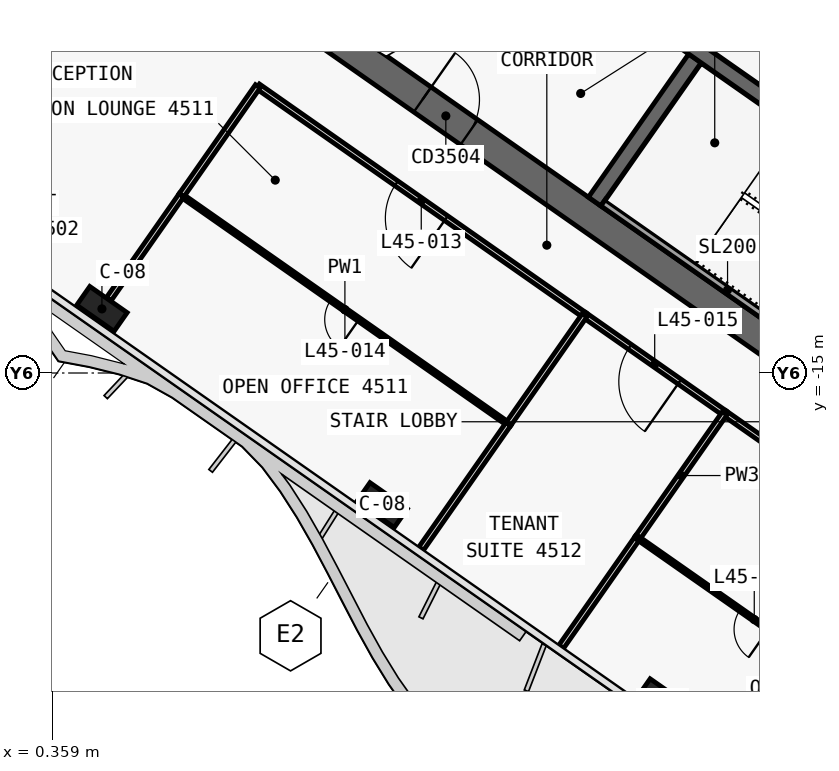
"""IFC4 building model, lengths in metres.
Left out: names, types, materials, properties, quantities, classifications, styles, units other than length and angle.
Written with IfcOpenShell. Run it as: python <this file> out.ifc"""

import sys

from ifc_helpers import new_model, si_unit, direction, frame, frame_2d, origin, origin_2d, place, context, subcontext, project, spatial, polyline, rectangle, outline, extrude, element, fill, save


model = new_model("IFC4")
c1 = context("Model", 3, precision=1e-05, world=origin(), true_north=direction((0.0, 1.0)))
c2 = subcontext(c1, "Body", "Model", "MODEL_VIEW")
j1 = project(units=[si_unit("LENGTHUNIT", "METRE"), si_unit("PLANEANGLEUNIT", "RADIAN")], contexts=[c1])
p1 = place(None, origin())
s1 = spatial("IfcSite", under=j1, at=p1, CompositionType="ELEMENT")
p2 = place(p1, origin())
s2 = spatial("IfcBuilding", under=s1, at=p2, CompositionType="ELEMENT")
p3 = place(p2, frame((0.0, 0.0, 194.4)))
s3 = spatial("IfcBuildingStorey", under=s2, at=p3, CompositionType="ELEMENT", Elevation=194.4)
p4 = place(p3, frame((-0.029, 11.984, 0.0), z_axis=(0.0, 0.0, 1.0), x_axis=(0.819151382952, -0.573577380837, 0.0)))
e1 = element("IfcWall", 1, at=p4, inside=s3, PredefinedType="SHEAR", context=c2, shape_type="SweptSolid", body=[
    extrude(outline(polyline([(33.898, 0.4), (-0.0, 0.4), (0.56, -0.4), (33.898, -0.4), (33.898, 0.4)])), origin(), (0.0, 0.0, 1.0), 3.9),
])
p5 = place(p3, frame((-0.029, -0.712, 0.0), z_axis=(0.0, 0.0, 1.0), x_axis=(0.819151758019, -0.573576845187, 0.0)))
e2 = element("IfcWall", 2, at=p5, inside=s3, PredefinedType="SHEAR", context=c2, shape_type="SweptSolid", body=[
    extrude(outline(polyline([(26.616, 0.4), (-0.0, 0.4), (0.56, -0.4), (26.616, -0.4), (26.616, 0.4)])), origin(), (0.0, 0.0, 1.0), 3.9),
])
p6 = place(p5, frame((6.666, 0.0, 0.0)))
e3 = element("IfcOpeningElement", 3, at=p6, cuts=e2, PredefinedType="OPENING", context=c2, shape_type="SweptSolid", body=[
    extrude(rectangle(XDim=1.5, YDim=2.1, at=frame_2d((0.75, 1.05))), frame((0.0, 0.41, 0.0), z_axis=(0.0, -1.0, 0.0), x_axis=(1.0, 0.0, 0.0)), (0.0, 0.0, 1.0), 0.82),
])
p7 = place(p5, frame((12.366, 0.0, 0.0)))
e4 = element("IfcOpeningElement", 4, at=p7, cuts=e2, PredefinedType="OPENING", context=c2, shape_type="SweptSolid", body=[
    extrude(rectangle(XDim=1.5, YDim=2.1, at=frame_2d((0.75, 1.05))), frame((0.0, 0.41, 0.0), z_axis=(0.0, -1.0, 0.0), x_axis=(1.0, 0.0, 0.0)), (0.0, 0.0, 1.0), 0.82),
])
p8 = place(p3, frame((14.63, -10.488, 0.0), z_axis=(0.0, 0.0, 1.0), x_axis=(0.573611936273, 0.819127185829, 0.0)))
e5 = element("IfcWall", 5, at=p8, inside=s3, PredefinedType="SHEAR", context=c2, shape_type="SweptSolid", body=[
    extrude(outline(polyline([(0.0, 0.2), (0.0, -0.2), (4.6, -0.2), (4.6, 0.2), (0.0, 0.2)])), origin(), (0.0, 0.0, 1.0), 3.9),
])
p9 = place(p3, frame((2.638, 3.768, 0.0), z_axis=(0.0, 0.0, 1.0), x_axis=(0.81915267502, -0.573575535572, 0.0)))
e6 = element("IfcWall", 6, at=p9, inside=s3, PredefinedType="SHEAR", context=c2, shape_type="SweptSolid", body=[
    extrude(outline(polyline([(0.0, 0.2), (0.0, -0.2), (26.2, -0.2), (26.2, 0.2), (0.0, 0.2)])), origin(), (0.0, 0.0, 1.0), 3.9),
])
p10 = place(p9, frame((9.637, 0.0, 0.0)))
e7 = element("IfcOpeningElement", 7, at=p10, cuts=e6, PredefinedType="OPENING", context=c2, shape_type="SweptSolid", body=[
    extrude(rectangle(XDim=1.2, YDim=2.1, at=frame_2d((0.6, 1.05))), frame((0.0, 0.21, 0.0), z_axis=(0.0, -1.0, 0.0), x_axis=(1.0, 0.0, 0.0)), (0.0, 0.0, 1.0), 0.42),
])
p11 = place(p9, frame((11.812, 0.0, 0.0)))
e8 = element("IfcOpeningElement", 8, at=p11, cuts=e6, PredefinedType="OPENING", context=c2, shape_type="SweptSolid", body=[
    extrude(rectangle(XDim=1.2, YDim=2.1, at=frame_2d((0.6, 1.05))), frame((0.0, 0.21, 0.0), z_axis=(0.0, -1.0, 0.0), x_axis=(1.0, 0.0, 0.0)), (0.0, 0.0, 1.0), 0.42),
])
p12 = place(p9, frame((13.988, 0.0, 0.0)))
e9 = element("IfcOpeningElement", 9, at=p12, cuts=e6, PredefinedType="OPENING", context=c2, shape_type="SweptSolid", body=[
    extrude(rectangle(XDim=1.2, YDim=2.1, at=frame_2d((0.6, 1.05))), frame((0.0, 0.21, 0.0), z_axis=(0.0, -1.0, 0.0), x_axis=(1.0, 0.0, 0.0)), (0.0, 0.0, 1.0), 0.42),
])
p13 = place(p9, frame((16.262, 0.0, 0.0)))
e10 = element("IfcOpeningElement", 10, at=p13, cuts=e6, PredefinedType="OPENING", context=c2, shape_type="SweptSolid", body=[
    extrude(rectangle(XDim=1.0, YDim=2.1, at=frame_2d((0.5, 1.05))), frame((0.0, 0.21, 0.0), z_axis=(0.0, -1.0, 0.0), x_axis=(1.0, 0.0, 0.0)), (0.0, 0.0, 1.0), 0.42),
])
for number, where, z_axis, x_axis in (
    (11, (1.665, -13.313, 0.0), (0.0, 0.0, 1.0), (0.819, -0.574, 0.0)),
    (12, (9.038, -18.475, 0.0), (0.0, 0.0, 1.0), (0.819, -0.574, 0.0)),
    (13, (16.41, -23.637, 0.0), (0.0, 0.0, 1.0), (0.819, -0.574, 0.0)),
):
    element("IfcColumn", number, at=place(p3, frame(where, z_axis=z_axis, x_axis=x_axis)), inside=s3, PredefinedType="COLUMN", context=c2, shape_type="SweptSolid", body=[
        extrude(rectangle(XDim=1.2, YDim=0.6, at=origin_2d()), origin(), (0.0, 0.0, 1.0), 3.9),
    ])
p14 = place(p3, frame((14.851, -10.521, 0.0), z_axis=(0.0, 0.0, 1.0), x_axis=(0.819141584393, -0.57359137434, 0.0)))
e14 = element("IfcWall", 14, at=p14, inside=s3, PredefinedType="SOLIDWALL", context=c2, shape_type="SweptSolid", body=[
    extrude(rectangle(XDim=8.0, YDim=0.2, at=frame_2d((4.0, 0.0))), origin(), (0.0, 0.0, 1.0), 3.62),
])
p15 = place(p3, frame((14.369, -13.479, 0.0), z_axis=(0.0, 0.0, 1.0), x_axis=(-0.819154371039, 0.573573113393, 0.0)))
e15 = element("IfcWall", 15, at=p15, inside=s3, PredefinedType="PARTITIONING", context=c2, shape_type="SweptSolid", body=[
    extrude(rectangle(XDim=10.502, YDim=0.15, at=frame_2d((5.251, 0.0))), origin(), (0.0, 0.0, 1.0), 3.0),
])
p16 = place(p15, frame((4.451, 0.0, 0.0)))
e16 = element("IfcOpeningElement", 16, at=p16, cuts=e15, PredefinedType="OPENING", context=c2, shape_type="SweptSolid", body=[
    extrude(rectangle(XDim=1.6, YDim=2.1, at=frame_2d((0.8, 1.05))), frame((0.0, 0.085, 0.0), z_axis=(0.0, -1.0, 0.0), x_axis=(1.0, 0.0, 0.0)), (0.0, 0.0, 1.0), 0.17),
])
p17 = place(p3, frame((18.055, -16.061, 0.0), z_axis=(0.0, 0.0, 1.0), x_axis=(-0.819183534257, 0.573531461389, 0.0)))
e17 = element("IfcWall", 17, at=p17, inside=s3, PredefinedType="PARTITIONING", context=c2, shape_type="SweptSolid", body=[
    extrude(rectangle(XDim=4.504, YDim=0.15, at=frame_2d((2.252, 0.0))), origin(), (0.0, 0.0, 1.0), 3.62),
])
p18 = place(p17, frame((1.452, 0.0, 0.0)))
e18 = element("IfcOpeningElement", 18, at=p18, cuts=e17, PredefinedType="OPENING", context=c2, shape_type="SweptSolid", body=[
    extrude(rectangle(XDim=1.6, YDim=2.1, at=frame_2d((0.8, 1.05))), frame((0.0, 0.085, 0.0), z_axis=(0.0, -1.0, 0.0), x_axis=(1.0, 0.0, 0.0)), (0.0, 0.0, 1.0), 0.17),
])
p19 = place(p3, frame((24.199, -20.362, 0.0), z_axis=(0.0, 0.0, 1.0), x_axis=(-0.819164661457, 0.573558416746, 0.0)))
e19 = element("IfcWall", 19, at=p19, inside=s3, PredefinedType="PARTITIONING", context=c2, shape_type="SweptSolid", body=[
    extrude(rectangle(XDim=7.504, YDim=0.15, at=frame_2d((3.752, 0.0))), origin(), (0.0, 0.0, 1.0), 3.0),
])
p20 = place(p19, frame((2.952, 0.0, 0.0)))
e20 = element("IfcOpeningElement", 20, at=p20, cuts=e19, PredefinedType="OPENING", context=c2, shape_type="SweptSolid", body=[
    extrude(rectangle(XDim=1.6, YDim=2.1, at=frame_2d((0.8, 1.05))), frame((0.0, 0.085, 0.0), z_axis=(0.0, -1.0, 0.0), x_axis=(1.0, 0.0, 0.0)), (0.0, 0.0, 1.0), 0.17),
])
p21 = place(p3, frame((12.359, -16.346, 0.0), z_axis=(0.0, 0.0, 1.0), x_axis=(-0.819155448096, 0.573571575181, 0.0)))
e21 = element("IfcWall", 21, at=p21, inside=s3, PredefinedType="PARTITIONING", context=c2, shape_type="SweptSolid", body=[
    extrude(rectangle(XDim=10.5, YDim=0.1, at=frame_2d((5.25, 0.0))), origin(), (0.0, 0.0, 1.0), 3.0),
])
p22 = place(p21, frame((4.8, 0.0, 0.0)))
e22 = element("IfcOpeningElement", 22, at=p22, cuts=e21, PredefinedType="OPENING", context=c2, shape_type="SweptSolid", body=[
    extrude(rectangle(XDim=0.9, YDim=2.1, at=frame_2d((0.45, 1.05))), frame((0.0, 0.06, 0.0), z_axis=(0.0, -1.0, 0.0), x_axis=(1.0, 0.0, 0.0)), (0.0, 0.0, 1.0), 0.12),
])
p23 = place(p3, frame((12.359, -16.346, 0.0), z_axis=(0.0, 0.0, 1.0), x_axis=(-0.573560675104, -0.819163080207, 0.0)))
e23 = element("IfcWall", 23, at=p23, inside=s3, PredefinedType="PARTITIONING", context=c2, shape_type="SweptSolid", body=[
    extrude(rectangle(XDim=3.999, YDim=0.15, at=frame_2d((2.0, 0.0))), origin(), (0.0, 0.0, 1.0), 2.9),
])
p24 = place(p3, frame((1.849, -13.051, 0.0), z_axis=(0.0, 0.0, 1.0), x_axis=(0.573595235521, 0.819138880647, 0.0)))
e24 = element("IfcWall", 24, at=p24, inside=s3, PredefinedType="PARTITIONING", context=c2, shape_type="SweptSolid", body=[
    extrude(rectangle(XDim=3.329, YDim=0.15, at=frame_2d((1.665, 0.0))), origin(), (0.0, 0.0, 1.0), 3.0),
])
p25 = place(p3, frame((14.367, -13.479, 0.0), z_axis=(0.0, 0.0, 1.0), x_axis=(-0.573598101901, -0.81913687348, 0.0)))
e25 = element("IfcWall", 25, at=p25, inside=s3, PredefinedType="PARTITIONING", context=c2, shape_type="SweptSolid", body=[
    extrude(rectangle(XDim=3.5, YDim=0.15, at=frame_2d((1.75, 0.0))), origin(), (0.0, 0.0, 1.0), 3.62),
])
p26 = place(p3, frame((3.759, -10.323, 0.0), z_axis=(0.0, 0.0, 1.0), x_axis=(0.573598101901, 0.81913687348, 0.0)))
e26 = element("IfcWall", 26, at=p26, inside=s3, PredefinedType="PARTITIONING", context=c2, shape_type="SweptSolid", body=[
    extrude(rectangle(XDim=3.5, YDim=0.15, at=frame_2d((1.75, 0.0))), origin(), (0.0, 0.0, 1.0), 3.0),
])
p27 = place(p3, frame((15.76, -19.335, 0.0), z_axis=(0.0, 0.0, 1.0), x_axis=(-0.573607413343, -0.819130353093, 0.0)))
e27 = element("IfcWall", 27, at=p27, inside=s3, PredefinedType="PARTITIONING", context=c2, shape_type="SweptSolid", body=[
    extrude(rectangle(XDim=3.501, YDim=0.15, at=frame_2d((1.75, 0.0))), origin(), (0.0, 0.0, 1.0), 2.9),
])
p28 = place(p3, frame((18.054, -16.06, 0.0), z_axis=(0.0, 0.0, 1.0), x_axis=(-0.573589265117, -0.819143061341, 0.0)))
e28 = element("IfcWall", 28, at=p28, inside=s3, PredefinedType="PARTITIONING", context=c2, shape_type="SweptSolid", body=[
    extrude(rectangle(XDim=4.002, YDim=0.15, at=frame_2d((2.001, 0.0))), origin(), (0.0, 0.0, 1.0), 3.62),
])
p29 = place(p3, frame((21.902, -23.639, 0.0), z_axis=(0.0, 0.0, 1.0), x_axis=(-0.81915238829, 0.573575945067, 0.0)))
e29 = element("IfcWall", 29, at=p29, inside=s3, PredefinedType="PARTITIONING", context=c2, shape_type="SweptSolid", body=[
    extrude(rectangle(XDim=7.5, YDim=0.1, at=frame_2d((3.75, 0.0))), origin(), (0.0, 0.0, 1.0), 3.0),
])
p30 = place(p29, frame((3.3, 0.0, 0.0)))
e30 = element("IfcOpeningElement", 30, at=p30, cuts=e29, PredefinedType="OPENING", context=c2, shape_type="SweptSolid", body=[
    extrude(rectangle(XDim=0.9, YDim=2.1, at=frame_2d((0.45, 1.05))), frame((0.0, 0.06, 0.0), z_axis=(0.0, -1.0, 0.0), x_axis=(1.0, 0.0, 0.0)), (0.0, 0.0, 1.0), 0.12),
])
p31 = place(p7, origin())
e31 = element("IfcDoor", 31, at=p31, inside=s3, OperationType="DOUBLE_DOOR_SINGLE_SWING", PredefinedType="DOOR", context=c2, shape_type="SweptSolid", body=[
    extrude(rectangle(XDim=1.5, YDim=2.1, at=frame_2d((0.75, 1.05))), frame((0.0, 0.025, 0.0), z_axis=(0.0, -1.0, 0.0), x_axis=(1.0, 0.0, 0.0)), (0.0, 0.0, 1.0), 0.05),
])
fill(e4, e31)
p32 = place(p16, origin())
e32 = element("IfcDoor", 32, at=p32, inside=s3, OperationType="DOUBLE_DOOR_SINGLE_SWING", PredefinedType="DOOR", context=c2, shape_type="SweptSolid", body=[
    extrude(rectangle(XDim=1.6, YDim=2.1, at=frame_2d((0.8, 1.05))), frame((0.0, 0.025, 0.0), z_axis=(0.0, -1.0, 0.0), x_axis=(1.0, 0.0, 0.0)), (0.0, 0.0, 1.0), 0.05),
])
fill(e16, e32)
p33 = place(p22, origin())
e33 = element("IfcDoor", 33, at=p33, inside=s3, OperationType="SINGLE_SWING_LEFT", PredefinedType="DOOR", context=c2, shape_type="SweptSolid", body=[
    extrude(rectangle(XDim=0.9, YDim=2.1, at=frame_2d((0.45, 1.05))), frame((0.0, 0.025, 0.0), z_axis=(0.0, -1.0, 0.0), x_axis=(1.0, 0.0, 0.0)), (0.0, 0.0, 1.0), 0.05),
])
fill(e22, e33)
p34 = place(p18, origin())
e34 = element("IfcDoor", 34, at=p34, inside=s3, OperationType="DOUBLE_DOOR_SINGLE_SWING", PredefinedType="DOOR", context=c2, shape_type="SweptSolid", body=[
    extrude(rectangle(XDim=1.6, YDim=2.1, at=frame_2d((0.8, 1.05))), frame((0.0, 0.025, 0.0), z_axis=(0.0, -1.0, 0.0), x_axis=(1.0, 0.0, 0.0)), (0.0, 0.0, 1.0), 0.05),
])
fill(e18, e34)
p35 = place(p30, origin())
e35 = element("IfcDoor", 35, at=p35, inside=s3, OperationType="SINGLE_SWING_RIGHT", PredefinedType="DOOR", context=c2, shape_type="SweptSolid", body=[
    extrude(rectangle(XDim=0.9, YDim=2.1, at=frame_2d((0.45, 1.05))), frame((0.0, 0.025, 0.0), z_axis=(0.0, -1.0, 0.0), x_axis=(1.0, 0.0, 0.0)), (0.0, 0.0, 1.0), 0.05),
])
fill(e30, e35)
save(model, sys.argv[1])
